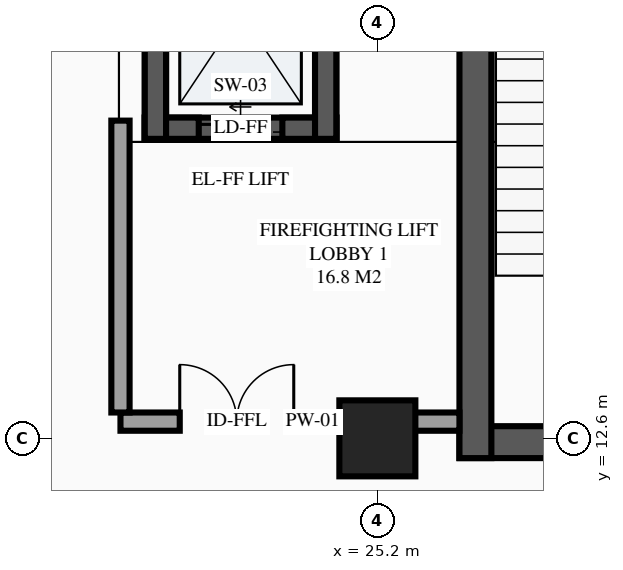
"""IFC4 building model, lengths in metres.
Left out: names, types, materials, properties, quantities, classifications, styles, units other than length and angle.
Written with IfcOpenShell. Run it as: python <this file> out.ifc"""

import sys

from ifc_helpers import new_model, si_unit, direction, frame, frame_2d, origin, origin_2d, place, context, subcontext, project, spatial, rectangle, extrude, element, fill, save


model = new_model("IFC4")
c1 = context("Model", 3, precision=1e-05, world=origin(), true_north=direction((0.0, 1.0)))
c2 = subcontext(c1, "Body", "Model", "MODEL_VIEW")
j1 = project(units=[si_unit("LENGTHUNIT", "METRE"), si_unit("PLANEANGLEUNIT", "RADIAN")], contexts=[c1])
p1 = place(None, origin())
s1 = spatial("IfcSite", under=j1, at=p1, CompositionType="ELEMENT")
p2 = place(p1, origin())
s2 = spatial("IfcBuilding", under=s1, at=p2, CompositionType="ELEMENT")
p3 = place(p2, frame((0.0, 0.0, -4.5)))
s3 = spatial("IfcBuildingStorey", under=s2, at=p3, CompositionType="ELEMENT", Elevation=-4.5)
p4 = place(p3, frame((25.2, 12.6, -0.36), z_axis=(0.0, 0.0, 1.0), x_axis=(1.0, 0.0, 0.0)))
e1 = element("IfcColumn", 1, at=p4, inside=s3, PredefinedType="COLUMN", context=c2, shape_type="SweptSolid", body=[
    extrude(rectangle(XDim=1.0, YDim=1.0, at=origin_2d()), origin(), (0.0, 0.0, 1.0), 4.86),
])
p5 = place(p3, frame((22.14, 16.68, -1.5), z_axis=(0.0, 0.0, 1.0), x_axis=(1.0, 0.0, 0.0)))
e2 = element("IfcWall", 2, at=p5, inside=s3, PredefinedType="SHEAR", context=c2, shape_type="SweptSolid", body=[
    extrude(rectangle(XDim=2.52, YDim=0.28, at=frame_2d((1.26, 0.0))), origin(), (0.0, 0.0, 1.0), 1.5),
])
for number, where, z_axis, x_axis in (
    (3, (24.52, 16.54, -1.5), (0.0, 0.0, 1.0), (0.0, 1.0, 0.0)),
    (4, (22.28, 19.86, -1.5), (0.0, 0.0, 1.0), (0.0, -1.0, 0.0)),
):
    element("IfcWall", number, at=place(p3, frame(where, z_axis=z_axis, x_axis=x_axis)), inside=s3, PredefinedType="SHEAR", context=c2, shape_type="SweptSolid", body=[
        extrude(rectangle(XDim=3.32, YDim=0.28, at=frame_2d((1.66, 0.0))), origin(), (0.0, 0.0, 1.0), 1.5),
    ])
p6 = place(p3, frame((22.14, 16.68, 0.0), z_axis=(0.0, 0.0, 1.0), x_axis=(1.0, 0.0, 0.0)))
e5 = element("IfcWall", 5, at=p6, inside=s3, PredefinedType="SHEAR", context=c2, shape_type="SweptSolid", body=[
    extrude(rectangle(XDim=2.52, YDim=0.28, at=frame_2d((1.26, 0.0))), origin(), (0.0, 0.0, 1.0), 4.5),
])
p7 = place(p6, frame((0.71, 0.0, 0.0)))
e6 = element("IfcOpeningElement", 6, at=p7, cuts=e5, PredefinedType="OPENING", context=c2, shape_type="SweptSolid", body=[
    extrude(rectangle(XDim=1.1, YDim=2.2, at=frame_2d((0.55, 1.1))), frame((0.0, 0.15, 0.0), z_axis=(0.0, -1.0, 0.0), x_axis=(1.0, 0.0, 0.0)), (0.0, 0.0, 1.0), 0.3),
])
for number, where, z_axis, x_axis in (
    (7, (24.52, 16.54, 0.0), (0.0, 0.0, 1.0), (0.0, 1.0, 0.0)),
    (8, (22.28, 19.86, 0.0), (0.0, 0.0, 1.0), (0.0, -1.0, 0.0)),
):
    element("IfcWall", number, at=place(p3, frame(where, z_axis=z_axis, x_axis=x_axis)), inside=s3, PredefinedType="SHEAR", context=c2, shape_type="SweptSolid", body=[
        extrude(rectangle(XDim=3.32, YDim=0.28, at=frame_2d((1.66, 0.0))), origin(), (0.0, 0.0, 1.0), 4.5),
    ])
p8 = place(p3, frame((26.28, 12.55, 0.0), z_axis=(0.0, 0.0, 1.0), x_axis=(1.0, 0.0, 0.0)))
e9 = element("IfcWall", 9, at=p8, inside=s3, PredefinedType="SHEAR", context=c2, shape_type="SweptSolid", body=[
    extrude(rectangle(XDim=5.44, YDim=0.42, at=frame_2d((2.72, 0.0))), origin(), (0.0, 0.0, 1.0), 4.5),
])
p9 = place(p8, frame((2.145, 0.0, 0.0)))
e10 = element("IfcOpeningElement", 10, at=p9, cuts=e9, PredefinedType="OPENING", context=c2, shape_type="SweptSolid", body=[
    extrude(rectangle(XDim=1.15, YDim=2.15, at=frame_2d((0.575, 1.075))), frame((0.0, 0.22, 0.0), z_axis=(0.0, -1.0, 0.0), x_axis=(1.0, 0.0, 0.0)), (0.0, 0.0, 1.0), 0.44),
])
p10 = place(p3, frame((26.49, 21.42, 0.0), z_axis=(0.0, 0.0, 1.0), x_axis=(0.0, -1.0, 0.0)))
e11 = element("IfcWall", 11, at=p10, inside=s3, PredefinedType="SHEAR", context=c2, shape_type="SweptSolid", body=[
    extrude(rectangle(XDim=9.08, YDim=0.42, at=frame_2d((4.54, 0.0))), origin(), (0.0, 0.0, 1.0), 4.5),
])
p11 = place(p3, frame((21.82, 12.82, 0.0), z_axis=(0.0, 0.0, 1.0), x_axis=(1.0, 0.0, 0.0)))
e12 = element("IfcWall", 12, at=p11, inside=s3, PredefinedType="PARTITIONING", context=c2, shape_type="SweptSolid", body=[
    extrude(rectangle(XDim=4.46, YDim=0.24, at=frame_2d((2.23, 0.0))), origin(), (0.0, 0.0, 1.0), 4.175),
])
p12 = place(p11, frame((0.78, 0.0, 0.0)))
e13 = element("IfcOpeningElement", 13, at=p12, cuts=e12, PredefinedType="OPENING", context=c2, shape_type="SweptSolid", body=[
    extrude(rectangle(XDim=1.5, YDim=2.15, at=frame_2d((0.75, 1.075))), frame((0.0, 0.13, 0.0), z_axis=(0.0, -1.0, 0.0), x_axis=(1.0, 0.0, 0.0)), (0.0, 0.0, 1.0), 0.26),
])
p13 = place(p3, frame((21.82, 12.94, 0.0), z_axis=(0.0, 0.0, 1.0), x_axis=(0.0, 1.0, 0.0)))
e14 = element("IfcWall", 14, at=p13, inside=s3, PredefinedType="PARTITIONING", context=c2, shape_type="SweptSolid", body=[
    extrude(rectangle(XDim=3.84, YDim=0.24, at=frame_2d((1.92, 0.0))), origin(), (0.0, 0.0, 1.0), 4.175),
])
p14 = place(p7, origin())
e15 = element("IfcDoor", 15, at=p14, inside=s3, OperationType="SLIDING_TO_LEFT", PredefinedType="DOOR", context=c2, shape_type="SweptSolid", body=[
    extrude(rectangle(XDim=1.1, YDim=2.2, at=frame_2d((0.55, 1.1))), frame((0.0, 0.025, 0.0), z_axis=(0.0, -1.0, 0.0), x_axis=(1.0, 0.0, 0.0)), (0.0, 0.0, 1.0), 0.05),
])
fill(e6, e15)
p15 = place(p12, origin())
e16 = element("IfcDoor", 16, at=p15, inside=s3, OperationType="DOUBLE_DOOR_SINGLE_SWING", PredefinedType="DOOR", context=c2, shape_type="SweptSolid", body=[
    extrude(rectangle(XDim=1.5, YDim=2.15, at=frame_2d((0.75, 1.075))), frame((0.0, 0.025, 0.0), z_axis=(0.0, -1.0, 0.0), x_axis=(1.0, 0.0, 0.0)), (0.0, 0.0, 1.0), 0.05),
])
fill(e13, e16)
save(model, sys.argv[1])
